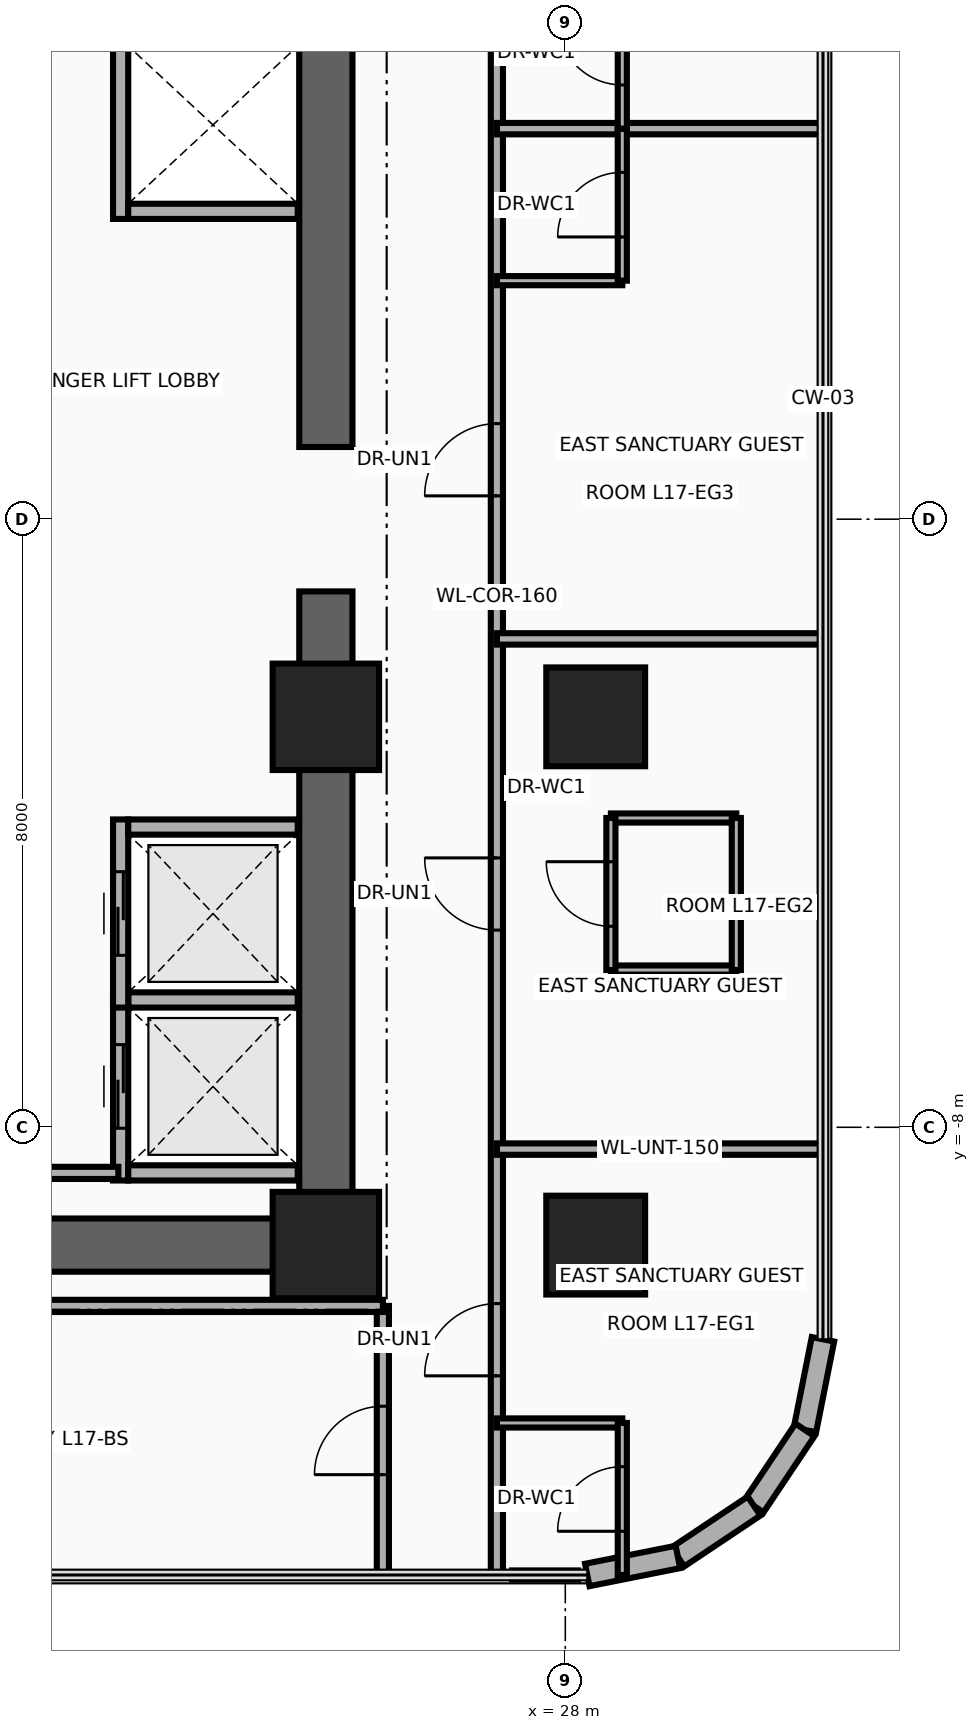
"""IFC4 building model, lengths in metres.
Left out: names, types, materials, properties, quantities, classifications, styles, units other than length and angle.
Written with IfcOpenShell. Run it as: python <this file> out.ifc"""

import sys

from ifc_helpers import new_model, si_unit, direction, frame, frame_2d, origin, origin_2d, place, context, subcontext, project, spatial, rectangle, circle, extrude, source, transform, mapped, element, fill, save


model = new_model("IFC4")
c1 = context("Model", 3, precision=1e-05, world=origin(), true_north=direction((0.0, 1.0)))
c2 = subcontext(c1, "Body", "Model", "MODEL_VIEW")
j1 = project(units=[si_unit("LENGTHUNIT", "METRE"), si_unit("PLANEANGLEUNIT", "RADIAN")], contexts=[c1])
p1 = place(None, origin())
s1 = spatial("IfcSite", under=j1, at=p1, CompositionType="ELEMENT")
p2 = place(p1, origin())
s2 = spatial("IfcBuilding", under=s1, at=p2, CompositionType="ELEMENT")
p3 = place(p2, frame((0.0, 0.0, 70.4)))
s3 = spatial("IfcBuildingStorey", under=s2, at=p3, CompositionType="ELEMENT", Elevation=70.4)
for number, where, z_axis, x_axis in (
    (1, (24.85, -9.9, 0.0), (0.0, 0.0, 1.0), (0.0, 1.0, 0.0)),
    (2, (24.85, 0.95, 0.0), (0.0, 0.0, 1.0), (0.0, 1.0, 0.0)),
):
    element("IfcWall", number, at=place(p3, frame(where, z_axis=z_axis, x_axis=x_axis)), inside=s3, PredefinedType="SHEAR", context=c2, shape_type="SweptSolid", body=[
        extrude(rectangle(XDim=8.95, YDim=0.7, at=frame_2d((4.475, 0.0))), origin(), (0.0, 0.0, 1.0), 3.46),
    ])
p4 = place(p3, frame((15.85, -9.55, 0.0), z_axis=(0.0, 0.0, 1.0), x_axis=(1.0, 0.0, 0.0)))
e3 = element("IfcWall", 3, at=p4, inside=s3, PredefinedType="SHEAR", context=c2, shape_type="SweptSolid", body=[
    extrude(rectangle(XDim=9.0, YDim=0.7, at=frame_2d((4.5, 0.0))), origin(), (0.0, 0.0, 1.0), 3.46),
])
m1 = source(origin(), c2, "Body", "SweptSolid", [
    extrude(rectangle(XDim=1.4, YDim=1.4, at=origin_2d()), origin(), (0.0, 0.0, 1.0), 3.7),
])
p5 = place(p3, frame((24.85, -9.55, 0.0), z_axis=(0.0, 0.0, 1.0), x_axis=(1.0, 0.0, 0.0)))
e4 = element("IfcColumn", 4, at=p5, inside=s3, PredefinedType="COLUMN", context=c2, shape_type="MappedRepresentation", body=[
    mapped(m1, transform((0.0, 0.0, 0.0), x_axis=(1.0, 0.0, 0.0), y_axis=(0.0, 1.0, 0.0), z_axis=(0.0, 0.0, 1.0), scale=1.0)),
])
m2 = source(origin(), c2, "Body", "SweptSolid", [
    extrude(circle(Radius=0.65, at=origin_2d()), origin(), (0.0, 0.0, 1.0), 3.7),
])
p6 = place(p3, frame((28.4, -9.55, 0.0), z_axis=(0.0, 0.0, 1.0), x_axis=(1.0, 0.0, 0.0)))
e5 = element("IfcColumn", 5, at=p6, inside=s3, PredefinedType="COLUMN", context=c2, shape_type="MappedRepresentation", body=[
    mapped(m2, transform((0.0, 0.0, 0.0), x_axis=(1.0, 0.0, 0.0), y_axis=(0.0, 1.0, 0.0), z_axis=(0.0, 0.0, 1.0), scale=1.0)),
])
p7 = place(p3, frame((24.85, -2.6, 0.0), z_axis=(0.0, 0.0, 1.0), x_axis=(1.0, 0.0, 0.0)))
e6 = element("IfcColumn", 6, at=p7, inside=s3, PredefinedType="COLUMN", context=c2, shape_type="MappedRepresentation", body=[
    mapped(m1, transform((0.0, 0.0, 0.0), x_axis=(1.0, 0.0, 0.0), y_axis=(0.0, 1.0, 0.0), z_axis=(0.0, 0.0, 1.0), scale=1.0)),
])
p8 = place(p3, frame((28.4, -2.6, 0.0), z_axis=(0.0, 0.0, 1.0), x_axis=(1.0, 0.0, 0.0)))
e7 = element("IfcColumn", 7, at=p8, inside=s3, PredefinedType="COLUMN", context=c2, shape_type="MappedRepresentation", body=[
    mapped(m2, transform((0.0, 0.0, 0.0), x_axis=(1.0, 0.0, 0.0), y_axis=(0.0, 1.0, 0.0), z_axis=(0.0, 0.0, 1.0), scale=1.0)),
])
p9 = place(p3, frame((31.39, -10.789, 0.0), z_axis=(0.0, 0.0, 1.0), x_axis=(-0.194996050505, -0.980804027463, 0.0)))
e8 = element("IfcWall", 8, at=p9, inside=s3, PredefinedType="SOLIDWALL", context=c2, shape_type="SweptSolid", body=[
    extrude(rectangle(XDim=1.216, YDim=0.3, at=frame_2d((0.608, 0.0))), origin(), (0.0, 0.0, 1.0), 3.46),
])
for number, where, z_axis, x_axis in (
    (9, (31.153, -11.982, 0.0), (0.0, 0.0, 1.0), (-0.556, -0.831, 0.0)),
    (10, (30.483, -12.983, 0.0), (0.0, 0.0, 1.0), (-0.831, -0.556, 0.0)),
):
    element("IfcWall", number, at=place(p3, frame(where, z_axis=z_axis, x_axis=x_axis)), inside=s3, PredefinedType="SOLIDWALL", context=c2, shape_type="SweptSolid", body=[
        extrude(rectangle(XDim=1.205, YDim=0.3, at=frame_2d((0.603, 0.0))), origin(), (0.0, 0.0, 1.0), 3.46),
    ])
p10 = place(p3, frame((29.482, -13.653, 0.0), z_axis=(0.0, 0.0, 1.0), x_axis=(-0.980804027463, -0.194996050505, 0.0)))
e11 = element("IfcWall", 11, at=p10, inside=s3, PredefinedType="SOLIDWALL", context=c2, shape_type="SweptSolid", body=[
    extrude(rectangle(XDim=1.216, YDim=0.3, at=frame_2d((0.608, 0.0))), origin(), (0.0, 0.0, 1.0), 3.46),
])
p11 = place(p3, frame((22.15, -8.7, 0.0), z_axis=(0.0, 0.0, 1.0), x_axis=(0.0, 1.0, 0.0)))
e12 = element("IfcWall", 12, at=p11, inside=s3, PredefinedType="MOVABLE", context=c2, shape_type="SweptSolid", body=[
    extrude(rectangle(XDim=2.475, YDim=0.2, at=frame_2d((1.237, 0.0))), origin(), (0.0, 0.0, 1.0), 3.46),
])
p12 = place(p11, frame((0.688, 0.0, 0.0)))
e13 = element("IfcOpeningElement", 13, at=p12, cuts=e12, PredefinedType="OPENING", context=c2, shape_type="SweptSolid", body=[
    extrude(rectangle(XDim=1.1, YDim=2.1, at=frame_2d((0.55, 1.05))), frame((0.0, 0.115, 0.0), z_axis=(0.0, -1.0, 0.0), x_axis=(1.0, 0.0, 0.0)), (0.0, 0.0, 1.0), 0.23),
])
for number, where, z_axis, x_axis in (
    (14, (22.25, -8.6, 0.0), (0.0, 0.0, 1.0), (1.0, 0.0, 0.0)),
    (15, (22.25, -6.325, 0.0), (0.0, 0.0, 1.0), (1.0, 0.0, 0.0)),
):
    element("IfcWall", number, at=place(p3, frame(where, z_axis=z_axis, x_axis=x_axis)), inside=s3, PredefinedType="MOVABLE", context=c2, shape_type="SweptSolid", body=[
        extrude(rectangle(XDim=2.23, YDim=0.2, at=frame_2d((1.115, 0.0))), origin(), (0.0, 0.0, 1.0), 3.46),
    ])
p13 = place(p3, frame((22.15, -6.425, 0.0), z_axis=(0.0, 0.0, 1.0), x_axis=(0.0, 1.0, 0.0)))
e16 = element("IfcWall", 16, at=p13, inside=s3, PredefinedType="MOVABLE", context=c2, shape_type="SweptSolid", body=[
    extrude(rectangle(XDim=2.475, YDim=0.2, at=frame_2d((1.238, 0.0))), origin(), (0.0, 0.0, 1.0), 3.46),
])
p14 = place(p13, frame((0.688, 0.0, 0.0)))
e17 = element("IfcOpeningElement", 17, at=p14, cuts=e16, PredefinedType="OPENING", context=c2, shape_type="SweptSolid", body=[
    extrude(rectangle(XDim=1.1, YDim=2.1, at=frame_2d((0.55, 1.05))), frame((0.0, 0.115, 0.0), z_axis=(0.0, -1.0, 0.0), x_axis=(1.0, 0.0, 0.0)), (0.0, 0.0, 1.0), 0.23),
])
p15 = place(p3, frame((22.25, -4.05, 0.0), z_axis=(0.0, 0.0, 1.0), x_axis=(1.0, 0.0, 0.0)))
e18 = element("IfcWall", 18, at=p15, inside=s3, PredefinedType="MOVABLE", context=c2, shape_type="SweptSolid", body=[
    extrude(rectangle(XDim=2.23, YDim=0.2, at=frame_2d((1.115, 0.0))), origin(), (0.0, 0.0, 1.0), 3.46),
])
p16 = place(p3, frame((22.15, 3.95, 0.0), z_axis=(0.0, 0.0, 1.0), x_axis=(0.0, 1.0, 0.0)))
e19 = element("IfcWall", 19, at=p16, inside=s3, PredefinedType="MOVABLE", context=c2, shape_type="SweptSolid", body=[
    extrude(rectangle(XDim=2.475, YDim=0.2, at=frame_2d((1.238, 0.0))), origin(), (0.0, 0.0, 1.0), 3.46),
])
p17 = place(p3, frame((22.25, 4.05, 0.0), z_axis=(0.0, 0.0, 1.0), x_axis=(1.0, 0.0, 0.0)))
e20 = element("IfcWall", 20, at=p17, inside=s3, PredefinedType="MOVABLE", context=c2, shape_type="SweptSolid", body=[
    extrude(rectangle(XDim=2.23, YDim=0.2, at=frame_2d((1.115, 0.0))), origin(), (0.0, 0.0, 1.0), 2.245),
])
p18 = place(p3, frame((20.3, -8.6, 0.0), z_axis=(0.0, 0.0, 1.0), x_axis=(1.0, 0.0, 0.0)))
e21 = element("IfcWall", 21, at=p18, inside=s3, PredefinedType="PARTITIONING", context=c2, shape_type="SweptSolid", body=[
    extrude(rectangle(XDim=1.82, YDim=0.16, at=frame_2d((0.91, 0.0))), origin(), (0.0, 0.0, 1.0), 3.46),
])
p19 = place(p3, frame((25.6, -13.89, 0.0), z_axis=(0.0, 0.0, 1.0), x_axis=(0.0, 1.0, 0.0)))
e22 = element("IfcWall", 22, at=p19, inside=s3, PredefinedType="PARTITIONING", context=c2, shape_type="SweptSolid", body=[
    extrude(rectangle(XDim=3.54, YDim=0.16, at=frame_2d((1.77, 0.0))), origin(), (0.0, 0.0, 1.0), 3.46),
])
p20 = place(p19, frame((1.32, 0.0, 0.0)))
e23 = element("IfcOpeningElement", 23, at=p20, cuts=e22, PredefinedType="OPENING", context=c2, shape_type="SweptSolid", body=[
    extrude(rectangle(XDim=0.9, YDim=2.1, at=frame_2d((0.45, 1.05))), frame((0.0, 0.095, 0.0), z_axis=(0.0, -1.0, 0.0), x_axis=(1.0, 0.0, 0.0)), (0.0, 0.0, 1.0), 0.19),
])
p21 = place(p3, frame((13.41, -10.35, 0.0), z_axis=(0.0, 0.0, 1.0), x_axis=(1.0, 0.0, 0.0)))
e24 = element("IfcWall", 24, at=p21, inside=s3, PredefinedType="PARTITIONING", context=c2, shape_type="SweptSolid", body=[
    extrude(rectangle(XDim=12.19, YDim=0.16, at=frame_2d((6.095, 0.0))), origin(), (0.0, 0.0, 1.0), 3.46),
])
p22 = place(p3, frame((27.1, -13.89, 0.0), z_axis=(0.0, 0.0, 1.0), x_axis=(0.0, 1.0, 0.0)))
e25 = element("IfcWall", 25, at=p22, inside=s3, PredefinedType="PARTITIONING", context=c2, shape_type="SweptSolid", body=[
    extrude(rectangle(XDim=25.74, YDim=0.16, at=frame_2d((12.87, 0.0))), origin(), (0.0, 0.0, 1.0), 2.583),
])
p23 = place(p22, frame((2.62, 0.0, 0.0)))
e26 = element("IfcOpeningElement", 26, at=p23, cuts=e25, PredefinedType="OPENING", context=c2, shape_type="SweptSolid", body=[
    extrude(rectangle(XDim=0.95, YDim=2.15, at=frame_2d((0.475, 1.075))), frame((0.0, 0.095, 0.0), z_axis=(0.0, -1.0, 0.0), x_axis=(1.0, 0.0, 0.0)), (0.0, 0.0, 1.0), 0.19),
])
p24 = place(p22, frame((8.484, 0.0, 0.0)))
e27 = element("IfcOpeningElement", 27, at=p24, cuts=e25, PredefinedType="OPENING", context=c2, shape_type="SweptSolid", body=[
    extrude(rectangle(XDim=0.95, YDim=2.15, at=frame_2d((0.475, 1.075))), frame((0.0, 0.095, 0.0), z_axis=(0.0, -1.0, 0.0), x_axis=(1.0, 0.0, 0.0)), (0.0, 0.0, 1.0), 0.19),
])
p25 = place(p22, frame((14.197, 0.0, 0.0)))
e28 = element("IfcOpeningElement", 28, at=p25, cuts=e25, PredefinedType="OPENING", context=c2, shape_type="SweptSolid", body=[
    extrude(rectangle(XDim=0.95, YDim=2.15, at=frame_2d((0.475, 1.075))), frame((0.0, 0.095, 0.0), z_axis=(0.0, -1.0, 0.0), x_axis=(1.0, 0.0, 0.0)), (0.0, 0.0, 1.0), 0.19),
])
p26 = place(p22, frame((21.648, 0.0, 0.0)))
e29 = element("IfcOpeningElement", 29, at=p26, cuts=e25, PredefinedType="OPENING", context=c2, shape_type="SweptSolid", body=[
    extrude(rectangle(XDim=0.95, YDim=2.15, at=frame_2d((0.475, 1.075))), frame((0.0, 0.095, 0.0), z_axis=(0.0, -1.0, 0.0), x_axis=(1.0, 0.0, 0.0)), (0.0, 0.0, 1.0), 0.19),
])
for number, where, z_axis, x_axis in (
    (30, (27.1, -8.287, 0.0), (0.0, 0.0, 1.0), (1.0, 0.0, 0.0)),
    (31, (27.1, -1.575, 0.0), (0.0, 0.0, 1.0), (1.0, 0.0, 0.0)),
    (32, (27.1, 5.138, 0.0), (0.0, 0.0, 1.0), (1.0, 0.0, 0.0)),
):
    element("IfcWall", number, at=place(p3, frame(where, z_axis=z_axis, x_axis=x_axis)), inside=s3, PredefinedType="PARTITIONING", context=c2, shape_type="SweptSolid", body=[
        extrude(rectangle(XDim=4.29, YDim=0.15, at=frame_2d((2.145, 0.0))), origin(), (0.0, 0.0, 1.0), 2.896),
    ])
p27 = place(p3, frame((27.1, -11.89, 0.0), z_axis=(0.0, 0.0, 1.0), x_axis=(1.0, 0.0, 0.0)))
e33 = element("IfcWall", 33, at=p27, inside=s3, PredefinedType="PARTITIONING", context=c2, shape_type="SweptSolid", body=[
    extrude(rectangle(XDim=1.65, YDim=0.12, at=frame_2d((0.825, 0.0))), origin(), (0.0, 0.0, 1.0), 3.46),
])
p28 = place(p3, frame((28.75, -13.89, 0.0), z_axis=(0.0, 0.0, 1.0), x_axis=(0.0, 1.0, 0.0)))
e34 = element("IfcWall", 34, at=p28, inside=s3, PredefinedType="PARTITIONING", context=c2, shape_type="SweptSolid", body=[
    extrude(rectangle(XDim=2.0, YDim=0.12, at=frame_2d((1.0, 0.0))), origin(), (0.0, 0.0, 1.0), 3.46),
])
p29 = place(p28, frame((0.575, 0.0, 0.0)))
e35 = element("IfcOpeningElement", 35, at=p29, cuts=e34, PredefinedType="OPENING", context=c2, shape_type="SweptSolid", body=[
    extrude(rectangle(XDim=0.85, YDim=2.1, at=frame_2d((0.425, 1.05))), frame((0.0, 0.075, 0.0), z_axis=(0.0, -1.0, 0.0), x_axis=(1.0, 0.0, 0.0)), (0.0, 0.0, 1.0), 0.15),
])
p30 = place(p3, frame((27.3, -13.89, 0.0), z_axis=(0.0, 0.0, 1.0), x_axis=(1.0, 0.0, 0.0)))
e36 = element("IfcWall", 36, at=p30, inside=s3, PredefinedType="PARTITIONING", context=c2, shape_type="SweptSolid", body=[
    extrude(rectangle(XDim=0.867, YDim=0.12, at=frame_2d((0.433, 0.0))), origin(), (0.0, 0.0, 1.0), 3.46),
])
for number, where, z_axis, x_axis in (
    (37, (28.6, -5.931, 0.0), (0.0, 0.0, 1.0), (1.0, 0.0, 0.0)),
    (38, (28.6, -3.931, 0.0), (0.0, 0.0, 1.0), (1.0, 0.0, 0.0)),
):
    element("IfcWall", number, at=place(p3, frame(where, z_axis=z_axis, x_axis=x_axis)), inside=s3, PredefinedType="PARTITIONING", context=c2, shape_type="SweptSolid", body=[
        extrude(rectangle(XDim=1.65, YDim=0.12, at=frame_2d((0.825, 0.0))), origin(), (0.0, 0.0, 1.0), 3.46),
    ])
p31 = place(p3, frame((30.25, -5.931, 0.0), z_axis=(0.0, 0.0, 1.0), x_axis=(0.0, 1.0, 0.0)))
e39 = element("IfcWall", 39, at=p31, inside=s3, PredefinedType="PARTITIONING", context=c2, shape_type="SweptSolid", body=[
    extrude(rectangle(XDim=2.0, YDim=0.12, at=frame_2d((1.0, 0.0))), origin(), (0.0, 0.0, 1.0), 3.46),
])
p32 = place(p3, frame((28.6, -5.931, 0.0), z_axis=(0.0, 0.0, 1.0), x_axis=(0.0, 1.0, 0.0)))
e40 = element("IfcWall", 40, at=p32, inside=s3, PredefinedType="PARTITIONING", context=c2, shape_type="SweptSolid", body=[
    extrude(rectangle(XDim=2.0, YDim=0.12, at=frame_2d((1.0, 0.0))), origin(), (0.0, 0.0, 1.0), 3.46),
])
p33 = place(p32, frame((0.575, 0.0, 0.0)))
e41 = element("IfcOpeningElement", 41, at=p33, cuts=e40, PredefinedType="OPENING", context=c2, shape_type="SweptSolid", body=[
    extrude(rectangle(XDim=0.85, YDim=2.1, at=frame_2d((0.425, 1.05))), frame((0.0, 0.075, 0.0), z_axis=(0.0, -1.0, 0.0), x_axis=(1.0, 0.0, 0.0)), (0.0, 0.0, 1.0), 0.15),
])
p34 = place(p3, frame((27.1, 3.138, 0.0), z_axis=(0.0, 0.0, 1.0), x_axis=(1.0, 0.0, 0.0)))
e42 = element("IfcWall", 42, at=p34, inside=s3, PredefinedType="PARTITIONING", context=c2, shape_type="SweptSolid", body=[
    extrude(rectangle(XDim=1.65, YDim=0.12, at=frame_2d((0.825, 0.0))), origin(), (0.0, 0.0, 1.0), 2.896),
])
p35 = place(p3, frame((28.75, 3.138, 0.0), z_axis=(0.0, 0.0, 1.0), x_axis=(0.0, 1.0, 0.0)))
e43 = element("IfcWall", 43, at=p35, inside=s3, PredefinedType="PARTITIONING", context=c2, shape_type="SweptSolid", body=[
    extrude(rectangle(XDim=2.0, YDim=0.12, at=frame_2d((1.0, 0.0))), origin(), (0.0, 0.0, 1.0), 3.46),
])
p36 = place(p35, frame((0.575, 0.0, 0.0)))
e44 = element("IfcOpeningElement", 44, at=p36, cuts=e43, PredefinedType="OPENING", context=c2, shape_type="SweptSolid", body=[
    extrude(rectangle(XDim=0.85, YDim=2.1, at=frame_2d((0.425, 1.05))), frame((0.0, 0.075, 0.0), z_axis=(0.0, -1.0, 0.0), x_axis=(1.0, 0.0, 0.0)), (0.0, 0.0, 1.0), 0.15),
])
p37 = place(p3, frame((28.75, 5.138, 0.0), z_axis=(0.0, 0.0, 1.0), x_axis=(0.0, 1.0, 0.0)))
e45 = element("IfcWall", 45, at=p37, inside=s3, PredefinedType="PARTITIONING", context=c2, shape_type="SweptSolid", body=[
    extrude(rectangle(XDim=2.0, YDim=0.12, at=frame_2d((1.0, 0.0))), origin(), (0.0, 0.0, 1.0), 3.46),
])
p38 = place(p37, frame((0.575, 0.0, 0.0)))
e46 = element("IfcOpeningElement", 46, at=p38, cuts=e45, PredefinedType="OPENING", context=c2, shape_type="SweptSolid", body=[
    extrude(rectangle(XDim=0.85, YDim=2.1, at=frame_2d((0.425, 1.05))), frame((0.0, 0.075, 0.0), z_axis=(0.0, -1.0, 0.0), x_axis=(1.0, 0.0, 0.0)), (0.0, 0.0, 1.0), 0.15),
])
p39 = place(p12, origin())
e47 = element("IfcDoor", 47, at=p39, inside=s3, OperationType="DOUBLE_DOOR_SLIDING", PredefinedType="DOOR", context=c2, shape_type="SweptSolid", body=[
    extrude(rectangle(XDim=1.1, YDim=2.1, at=frame_2d((0.55, 1.05))), frame((0.0, 0.025, 0.0), z_axis=(0.0, -1.0, 0.0), x_axis=(1.0, 0.0, 0.0)), (0.0, 0.0, 1.0), 0.05),
])
fill(e13, e47)
p40 = place(p14, origin())
e48 = element("IfcDoor", 48, at=p40, inside=s3, OperationType="DOUBLE_DOOR_SLIDING", PredefinedType="DOOR", context=c2, shape_type="SweptSolid", body=[
    extrude(rectangle(XDim=1.1, YDim=2.1, at=frame_2d((0.55, 1.05))), frame((0.0, 0.025, 0.0), z_axis=(0.0, -1.0, 0.0), x_axis=(1.0, 0.0, 0.0)), (0.0, 0.0, 1.0), 0.05),
])
fill(e17, e48)
p41 = place(p20, origin())
e49 = element("IfcDoor", 49, at=p41, inside=s3, OperationType="SINGLE_SWING_RIGHT", PredefinedType="DOOR", context=c2, shape_type="SweptSolid", body=[
    extrude(rectangle(XDim=0.9, YDim=2.1, at=frame_2d((0.45, 1.05))), frame((0.0, 0.025, 0.0), z_axis=(0.0, -1.0, 0.0), x_axis=(1.0, 0.0, 0.0)), (0.0, 0.0, 1.0), 0.05),
])
fill(e23, e49)
p42 = place(p23, origin())
e50 = element("IfcDoor", 50, at=p42, inside=s3, OperationType="SINGLE_SWING_RIGHT", PredefinedType="DOOR", context=c2, shape_type="SweptSolid", body=[
    extrude(rectangle(XDim=0.95, YDim=2.15, at=frame_2d((0.475, 1.075))), frame((0.0, 0.025, 0.0), z_axis=(0.0, -1.0, 0.0), x_axis=(1.0, 0.0, 0.0)), (0.0, 0.0, 1.0), 0.05),
])
fill(e26, e50)
p43 = place(p29, origin())
e51 = element("IfcDoor", 51, at=p43, inside=s3, OperationType="SINGLE_SWING_LEFT", PredefinedType="DOOR", context=c2, shape_type="SweptSolid", body=[
    extrude(rectangle(XDim=0.85, YDim=2.1, at=frame_2d((0.425, 1.05))), frame((0.0, 0.025, 0.0), z_axis=(0.0, -1.0, 0.0), x_axis=(1.0, 0.0, 0.0)), (0.0, 0.0, 1.0), 0.05),
])
fill(e35, e51)
p44 = place(p24, origin())
e52 = element("IfcDoor", 52, at=p44, inside=s3, OperationType="SINGLE_SWING_RIGHT", PredefinedType="DOOR", context=c2, shape_type="SweptSolid", body=[
    extrude(rectangle(XDim=0.95, YDim=2.15, at=frame_2d((0.475, 1.075))), frame((0.0, 0.025, 0.0), z_axis=(0.0, -1.0, 0.0), x_axis=(1.0, 0.0, 0.0)), (0.0, 0.0, 1.0), 0.05),
])
fill(e27, e52)
p45 = place(p33, origin())
e53 = element("IfcDoor", 53, at=p45, inside=s3, OperationType="SINGLE_SWING_LEFT", PredefinedType="DOOR", context=c2, shape_type="SweptSolid", body=[
    extrude(rectangle(XDim=0.85, YDim=2.1, at=frame_2d((0.425, 1.05))), frame((0.0, 0.025, 0.0), z_axis=(0.0, -1.0, 0.0), x_axis=(1.0, 0.0, 0.0)), (0.0, 0.0, 1.0), 0.05),
])
fill(e41, e53)
p46 = place(p25, origin())
e54 = element("IfcDoor", 54, at=p46, inside=s3, OperationType="SINGLE_SWING_RIGHT", PredefinedType="DOOR", context=c2, shape_type="SweptSolid", body=[
    extrude(rectangle(XDim=0.95, YDim=2.15, at=frame_2d((0.475, 1.075))), frame((0.0, 0.025, 0.0), z_axis=(0.0, -1.0, 0.0), x_axis=(1.0, 0.0, 0.0)), (0.0, 0.0, 1.0), 0.05),
])
fill(e28, e54)
p47 = place(p36, origin())
e55 = element("IfcDoor", 55, at=p47, inside=s3, OperationType="SINGLE_SWING_LEFT", PredefinedType="DOOR", context=c2, shape_type="SweptSolid", body=[
    extrude(rectangle(XDim=0.85, YDim=2.1, at=frame_2d((0.425, 1.05))), frame((0.0, 0.025, 0.0), z_axis=(0.0, -1.0, 0.0), x_axis=(1.0, 0.0, 0.0)), (0.0, 0.0, 1.0), 0.05),
])
fill(e44, e55)
p48 = place(p38, origin())
e56 = element("IfcDoor", 56, at=p48, inside=s3, OperationType="SINGLE_SWING_LEFT", PredefinedType="DOOR", context=c2, shape_type="SweptSolid", body=[
    extrude(rectangle(XDim=0.85, YDim=2.1, at=frame_2d((0.425, 1.05))), frame((0.0, 0.025, 0.0), z_axis=(0.0, -1.0, 0.0), x_axis=(1.0, 0.0, 0.0)), (0.0, 0.0, 1.0), 0.05),
])
fill(e46, e56)
save(model, sys.argv[1])
